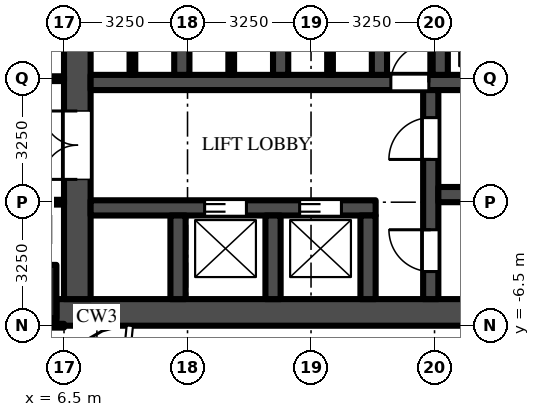
"""IFC4 building model, lengths in metres.
Left out: names, types, materials, properties, quantities, classifications, styles, units other than length and angle.
Written with IfcOpenShell. Run it as: python <this file> out.ifc"""

import sys

from ifc_helpers import new_model, si_unit, direction, frame, frame_2d, origin, origin_2d, place, context, subcontext, project, spatial, rectangle, extrude, source, transform, mapped, element, fill, save


model = new_model("IFC4")
c1 = context("Model", 3, precision=1e-05, world=origin(), true_north=direction((0.0, 1.0)))
c2 = subcontext(c1, "Body", "Model", "MODEL_VIEW")
j1 = project(units=[si_unit("LENGTHUNIT", "METRE"), si_unit("PLANEANGLEUNIT", "RADIAN")], contexts=[c1])
p1 = place(None, origin())
s1 = spatial("IfcSite", under=j1, at=p1, CompositionType="ELEMENT")
p2 = place(p1, origin())
s2 = spatial("IfcBuilding", under=s1, at=p2, CompositionType="ELEMENT")
p3 = place(p2, frame((0.0, 0.0, 52.0)))
s3 = spatial("IfcBuildingStorey", under=s2, at=p3, CompositionType="ELEMENT", Elevation=52.0)
m1 = source(origin(), c2, "Body", "SweptSolid", [
    extrude(rectangle(XDim=1.4, YDim=1.4, at=origin_2d()), origin(), (0.0, 0.0, 1.0), 4.5),
])
p4 = place(p3, frame((5.6, -5.6, 0.0), z_axis=(0.0, 0.0, 1.0), x_axis=(1.0, 0.0, 0.0)))
e1 = element("IfcColumn", 1, at=p4, inside=s3, PredefinedType="COLUMN", context=c2, shape_type="MappedRepresentation", body=[
    mapped(m1, transform((0.0, 0.0, 0.0))),
])
m2 = source(origin(), c2, "Body", "SweptSolid", [
    extrude(rectangle(XDim=16.45, YDim=0.7, at=frame_2d((8.225, 0.0))), origin(), (0.0, 0.0, 1.0), 4.25),
])
p5 = place(p3, frame((6.3, -6.15, 0.0), z_axis=(0.0, 0.0, 1.0), x_axis=(1.0, 0.0, 0.0)))
e2 = element("IfcWall", 2, at=p5, inside=s3, PredefinedType="SHEAR", context=c2, shape_type="MappedRepresentation", body=[
    mapped(m2, transform((0.0, 0.0, 0.0))),
])
m3 = source(origin(), c2, "Body", "SweptSolid", [
    extrude(rectangle(XDim=9.05, YDim=0.7, at=frame_2d((4.525, 0.0))), origin(), (0.0, 0.0, 1.0), 4.25),
])
p6 = place(p3, frame((6.85, -5.8, 0.0), z_axis=(0.0, 0.0, 1.0), x_axis=(0.0, 1.0, 0.0)))
e3 = element("IfcWall", 3, at=p6, inside=s3, PredefinedType="SHEAR", context=c2, shape_type="MappedRepresentation", body=[
    mapped(m3, transform((0.0, 0.0, 0.0))),
])
m4 = source(origin(), c2, "Body", "SweptSolid", [
    extrude(rectangle(XDim=1.8, YDim=2.1, at=frame_2d((0.9, 1.05))), frame((0.0, 0.36, 0.0), z_axis=(0.0, -1.0, 0.0), x_axis=(1.0, 0.0, 0.0)), (0.0, 0.0, 1.0), 0.72),
])
p7 = place(p6, frame((3.15, 0.0, 0.0)))
e4 = element("IfcOpeningElement", 4, at=p7, cuts=e3, PredefinedType="OPENING", context=c2, shape_type="MappedRepresentation", body=[
    mapped(m4, transform((0.0, 0.0, 0.0))),
])
m5 = source(origin(), c2, "Body", "SweptSolid", [
    extrude(rectangle(XDim=7.5, YDim=0.4, at=frame_2d((3.75, 0.0))), origin(), (0.0, 0.0, 1.0), 4.25),
])
p8 = place(p3, frame((7.2, -3.4, 0.0), z_axis=(0.0, 0.0, 1.0), x_axis=(1.0, 0.0, 0.0)))
e5 = element("IfcWall", 5, at=p8, inside=s3, PredefinedType="SHEAR", context=c2, shape_type="MappedRepresentation", body=[
    mapped(m5, transform((0.0, 0.0, 0.0))),
])
m6 = source(origin(), c2, "Body", "SweptSolid", [
    extrude(rectangle(XDim=1.1, YDim=2.1, at=frame_2d((0.55, 1.05))), frame((0.0, 0.21, 0.0), z_axis=(0.0, -1.0, 0.0), x_axis=(1.0, 0.0, 0.0)), (0.0, 0.0, 1.0), 0.42),
])
p9 = place(p8, frame((3.0, 0.0, 0.0)))
e6 = element("IfcOpeningElement", 6, at=p9, cuts=e5, PredefinedType="OPENING", context=c2, shape_type="MappedRepresentation", body=[
    mapped(m6, transform((0.0, 0.0, 0.0))),
])
p10 = place(p8, frame((5.5, 0.0, 0.0)))
e7 = element("IfcOpeningElement", 7, at=p10, cuts=e5, PredefinedType="OPENING", context=c2, shape_type="MappedRepresentation", body=[
    mapped(m6, transform((0.0, 0.0, 0.0))),
])
m7 = source(origin(), c2, "Body", "SweptSolid", [
    extrude(rectangle(XDim=14.85, YDim=0.4, at=frame_2d((7.425, 0.0))), origin(), (0.0, 0.0, 1.0), 4.25),
])
p11 = place(p3, frame((7.2, -0.1, 0.0), z_axis=(0.0, 0.0, 1.0), x_axis=(1.0, 0.0, 0.0)))
e8 = element("IfcWall", 8, at=p11, inside=s3, PredefinedType="SHEAR", context=c2, shape_type="MappedRepresentation", body=[
    mapped(m7, transform((0.0, 0.0, 0.0))),
])
m8 = source(origin(), c2, "Body", "SweptSolid", [
    extrude(rectangle(XDim=1.0, YDim=2.1, at=frame_2d((0.5, 1.05))), frame((0.0, 0.21, 0.0), z_axis=(0.0, -1.0, 0.0), x_axis=(1.0, 0.0, 0.0)), (0.0, 0.0, 1.0), 0.42),
])
p12 = place(p11, frame((7.9, 0.0, 0.0)))
e9 = element("IfcOpeningElement", 9, at=p12, cuts=e8, PredefinedType="OPENING", context=c2, shape_type="MappedRepresentation", body=[
    mapped(m8, transform((0.0, 0.0, 0.0))),
])
m9 = source(origin(), c2, "Body", "SweptSolid", [
    extrude(rectangle(XDim=5.5, YDim=0.4, at=frame_2d((2.75, 0.0))), origin(), (0.0, 0.0, 1.0), 4.25),
])
p13 = place(p3, frame((16.15, -5.8, 0.0), z_axis=(0.0, 0.0, 1.0), x_axis=(0.0, 1.0, 0.0)))
e10 = element("IfcWall", 10, at=p13, inside=s3, PredefinedType="SHEAR", context=c2, shape_type="MappedRepresentation", body=[
    mapped(m9, transform((0.0, 0.0, 0.0))),
])
p14 = place(p13, frame((0.725, 0.0, 0.0)))
e11 = element("IfcOpeningElement", 11, at=p14, cuts=e10, PredefinedType="OPENING", context=c2, shape_type="MappedRepresentation", body=[
    mapped(m6, transform((0.0, 0.0, 0.0))),
])
p15 = place(p13, frame((3.675, 0.0, 0.0)))
e12 = element("IfcOpeningElement", 12, at=p15, cuts=e10, PredefinedType="OPENING", context=c2, shape_type="MappedRepresentation", body=[
    mapped(m6, transform((0.0, 0.0, 0.0))),
])
m10 = source(origin(), c2, "Body", "SweptSolid", [
    extrude(rectangle(XDim=5.7, YDim=0.4, at=frame_2d((2.85, 0.0))), origin(), (0.0, 0.0, 1.0), 4.25),
])
p16 = place(p3, frame((16.35, -3.05, 0.0), z_axis=(0.0, 0.0, 1.0), x_axis=(1.0, 0.0, 0.0)))
e13 = element("IfcWall", 13, at=p16, inside=s3, PredefinedType="SHEAR", context=c2, shape_type="MappedRepresentation", body=[
    mapped(m10, transform((0.0, 0.0, 0.0))),
])
m11 = source(origin(), c2, "Body", "SweptSolid", [
    extrude(rectangle(XDim=2.2, YDim=0.4, at=frame_2d((1.1, 0.0))), origin(), (0.0, 0.0, 1.0), 4.25),
])
for number, where, z_axis, x_axis in (
    (14, (9.5, -5.8, 0.0), (0.0, 0.0, 1.0), (0.0, 1.0, 0.0)),
    (15, (12.0, -5.8, 0.0), (0.0, 0.0, 1.0), (0.0, 1.0, 0.0)),
    (16, (14.5, -5.8, 0.0), (0.0, 0.0, 1.0), (0.0, 1.0, 0.0)),
):
    element("IfcWall", number, at=place(p3, frame(where, z_axis=z_axis, x_axis=x_axis)), inside=s3, PredefinedType="SHEAR", context=c2, shape_type="MappedRepresentation", body=[
        mapped(m11, transform((0.0, 0.0, 0.0))),
    ])
m12 = source(origin(), c2, "Body", "SweptSolid", [
    extrude(rectangle(XDim=2.45, YDim=0.4, at=frame_2d((1.225, 0.0))), origin(), (0.0, 0.0, 1.0), 4.25),
])
for number, where, z_axis, x_axis in (
    (17, (9.6, 0.1, 0.0), (0.0, 0.0, 1.0), (0.0, 1.0, 0.0)),
    (18, (12.2, 0.1, 0.0), (0.0, 0.0, 1.0), (0.0, 1.0, 0.0)),
    (19, (14.8, 0.1, 0.0), (0.0, 0.0, 1.0), (0.0, 1.0, 0.0)),
    (20, (16.4, 0.1, 0.0), (0.0, 0.0, 1.0), (0.0, 1.0, 0.0)),
):
    element("IfcWall", number, at=place(p3, frame(where, z_axis=z_axis, x_axis=x_axis)), inside=s3, PredefinedType="SHEAR", context=c2, shape_type="MappedRepresentation", body=[
        mapped(m12, transform((0.0, 0.0, 0.0))),
    ])
m13 = source(origin(), c2, "Body", "SweptSolid", [
    extrude(rectangle(XDim=2.45, YDim=0.15, at=frame_2d((1.225, 0.0))), origin(), (0.0, 0.0, 1.0), 4.25),
])
for number, where, z_axis, x_axis in (
    (21, (8.3, 0.1, 0.0), (0.0, 0.0, 1.0), (0.0, 1.0, 0.0)),
    (22, (10.9, 0.1, 0.0), (0.0, 0.0, 1.0), (0.0, 1.0, 0.0)),
    (23, (13.5, 0.1, 0.0), (0.0, 0.0, 1.0), (0.0, 1.0, 0.0)),
):
    element("IfcWall", number, at=place(p3, frame(where, z_axis=z_axis, x_axis=x_axis)), inside=s3, PredefinedType="PARTITIONING", context=c2, shape_type="MappedRepresentation", body=[
        mapped(m13, transform((0.0, 0.0, 0.0))),
    ])
m14 = source(origin(), c2, "Body", "SweptSolid", [
    extrude(rectangle(XDim=5.238, YDim=0.1, at=frame_2d((2.619, 0.0))), origin(), (0.0, 0.0, 1.0), 3.33),
])
p17 = place(p3, frame((1.262, -6.5, 0.0), z_axis=(0.0, 0.0, 1.0), x_axis=(1.0, 0.0, 0.0)))
e24 = element("IfcWall", 24, at=p17, inside=s3, PredefinedType="PARTITIONING", context=c2, shape_type="MappedRepresentation", body=[
    mapped(m14, transform((0.0, 0.0, 0.0))),
])
m15 = source(origin(), c2, "Body", "SweptSolid", [
    extrude(rectangle(XDim=5.363, YDim=0.125, at=frame_2d((2.681, 0.0))), origin(), (0.0, 0.0, 1.0), 3.468),
])
p18 = place(p3, frame((6.5, -3.25, 0.0), z_axis=(0.0, 0.0, 1.0), x_axis=(-1.0, 0.0, 0.0)))
e25 = element("IfcWall", 25, at=p18, inside=s3, PredefinedType="PARTITIONING", context=c2, shape_type="MappedRepresentation", body=[
    mapped(m15, transform((0.0, 0.0, 0.0))),
])
m16 = source(origin(), c2, "Body", "SweptSolid", [
    extrude(rectangle(XDim=1.1, YDim=2.1, at=frame_2d((0.55, 1.05))), frame((0.0, 0.073, 0.0), z_axis=(0.0, -1.0, 0.0), x_axis=(1.0, 0.0, 0.0)), (0.0, 0.0, 1.0), 0.145),
])
p19 = place(p18, frame((0.35, 0.0, 0.0)))
e26 = element("IfcOpeningElement", 26, at=p19, cuts=e25, PredefinedType="OPENING", context=c2, shape_type="MappedRepresentation", body=[
    mapped(m16, transform((0.0, 0.0, 0.0))),
])
p20 = place(p3, frame((6.5, 0.0, 0.0), z_axis=(0.0, 0.0, 1.0), x_axis=(-1.0, 0.0, 0.0)))
e27 = element("IfcWall", 27, at=p20, inside=s3, PredefinedType="PARTITIONING", context=c2, shape_type="MappedRepresentation", body=[
    mapped(m15, transform((0.0, 0.0, 0.0))),
])
m17 = source(origin(), c2, "Body", "SweptSolid", [
    extrude(rectangle(XDim=1.0, YDim=2.1, at=frame_2d((0.5, 1.05))), frame((0.0, 0.073, 0.0), z_axis=(0.0, -1.0, 0.0), x_axis=(1.0, 0.0, 0.0)), (0.0, 0.0, 1.0), 0.145),
])
p21 = place(p20, frame((1.3, 0.0, 0.0)))
e28 = element("IfcOpeningElement", 28, at=p21, cuts=e27, PredefinedType="OPENING", context=c2, shape_type="MappedRepresentation", body=[
    mapped(m17, transform((0.0, 0.0, 0.0))),
])
m18 = source(origin(), c2, "Body", "SweptSolid", [
    extrude(rectangle(XDim=1.1, YDim=2.1, at=frame_2d((0.55, 1.05))), frame((0.0, 0.025, 0.0), z_axis=(0.0, -1.0, 0.0), x_axis=(1.0, 0.0, 0.0)), (0.0, 0.0, 1.0), 0.05),
])
p22 = place(p9, origin())
e29 = element("IfcDoor", 29, at=p22, inside=s3, OperationType="DOUBLE_DOOR_SLIDING", PredefinedType="DOOR", context=c2, shape_type="MappedRepresentation", body=[
    mapped(m18, transform((0.0, 0.0, 0.0))),
])
fill(e6, e29)
p23 = place(p10, origin())
e30 = element("IfcDoor", 30, at=p23, inside=s3, OperationType="DOUBLE_DOOR_SLIDING", PredefinedType="DOOR", context=c2, shape_type="MappedRepresentation", body=[
    mapped(m18, transform((0.0, 0.0, 0.0))),
])
fill(e7, e30)
m19 = source(origin(), c2, "Body", "SweptSolid", [
    extrude(rectangle(XDim=1.8, YDim=2.1, at=frame_2d((0.9, 1.05))), frame((0.0, -0.275, 0.0), z_axis=(0.0, -1.0, 0.0), x_axis=(1.0, 0.0, 0.0)), (0.0, 0.0, 1.0), 0.05),
])
p24 = place(p7, origin())
e31 = element("IfcDoor", 31, at=p24, inside=s3, OperationType="DOUBLE_DOOR_SINGLE_SWING", PredefinedType="DOOR", context=c2, shape_type="MappedRepresentation", body=[
    mapped(m19, transform((0.0, 0.0, 0.0))),
])
fill(e4, e31)
p25 = place(p14, origin())
e32 = element("IfcDoor", 32, at=p25, inside=s3, OperationType="SINGLE_SWING_RIGHT", PredefinedType="DOOR", context=c2, shape_type="MappedRepresentation", body=[
    mapped(m18, transform((0.0, 0.0, 0.0))),
])
fill(e11, e32)
p26 = place(p15, origin())
e33 = element("IfcDoor", 33, at=p26, inside=s3, OperationType="SINGLE_SWING_LEFT", PredefinedType="DOOR", context=c2, shape_type="MappedRepresentation", body=[
    mapped(m18, transform((0.0, 0.0, 0.0))),
])
fill(e12, e33)
m20 = source(origin(), c2, "Body", "SweptSolid", [
    extrude(rectangle(XDim=1.0, YDim=2.1, at=frame_2d((0.5, 1.05))), frame((0.0, 0.025, 0.0), z_axis=(0.0, -1.0, 0.0), x_axis=(1.0, 0.0, 0.0)), (0.0, 0.0, 1.0), 0.05),
])
p27 = place(p12, origin())
e34 = element("IfcDoor", 34, at=p27, inside=s3, OperationType="SINGLE_SWING_RIGHT", PredefinedType="DOOR", context=c2, shape_type="MappedRepresentation", body=[
    mapped(m20, transform((0.0, 0.0, 0.0))),
])
fill(e9, e34)
save(model, sys.argv[1])
